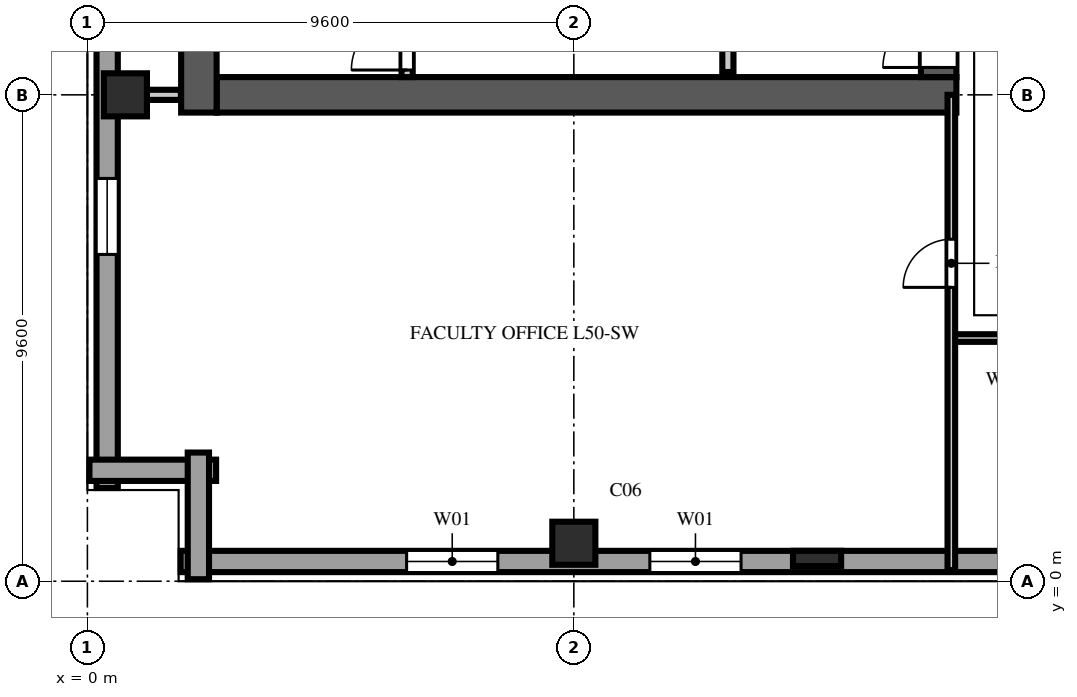
"""IFC4 building model, lengths in metres.
Left out: names, types, materials, properties, quantities, classifications, styles, units other than length and angle.
Written with IfcOpenShell. Run it as: python <this file> out.ifc"""

import sys

from ifc_helpers import new_model, si_unit, direction, frame, frame_2d, origin, origin_2d, place, context, subcontext, project, spatial, rectangle, extrude, element, fill, save


model = new_model("IFC4")
c1 = context("Model", 3, precision=1e-05, world=origin(), true_north=direction((0.0, 1.0)))
c2 = subcontext(c1, "Body", "Model", "MODEL_VIEW")
j1 = project(units=[si_unit("LENGTHUNIT", "METRE"), si_unit("PLANEANGLEUNIT", "RADIAN")], contexts=[c1])
p1 = place(None, origin())
s1 = spatial("IfcSite", under=j1, at=p1, CompositionType="ELEMENT")
p2 = place(p1, origin())
s2 = spatial("IfcBuilding", under=s1, at=p2, CompositionType="ELEMENT")
p3 = place(p2, frame((0.0, 0.0, 199.0)))
s3 = spatial("IfcBuildingStorey", under=s2, at=p3, CompositionType="ELEMENT", Elevation=199.0)
p4 = place(p3, frame((2.55, 9.6, 0.0), z_axis=(0.0, 0.0, 1.0), x_axis=(1.0, 0.0, 0.0)))
e1 = element("IfcWall", 1, at=p4, inside=s3, PredefinedType="SHEAR", context=c2, shape_type="SweptSolid", body=[
    extrude(rectangle(XDim=14.6, YDim=0.7, at=frame_2d((7.3, 0.0))), origin(), (0.0, 0.0, 1.0), 3.54),
])
p5 = place(p3, frame((2.2, 9.25, 0.0), z_axis=(0.0, 0.0, 1.0), x_axis=(0.0, 1.0, 0.0)))
e2 = element("IfcWall", 2, at=p5, inside=s3, PredefinedType="SHEAR", context=c2, shape_type="SweptSolid", body=[
    extrude(rectangle(XDim=39.1, YDim=0.7, at=frame_2d((19.55, 0.0))), origin(), (0.0, 0.0, 1.0), 3.54),
])
p6 = place(p3, frame((16.8, 9.95, 0.0), z_axis=(0.0, 0.0, 1.0), x_axis=(0.0, 1.0, 0.0)))
e3 = element("IfcWall", 3, at=p6, inside=s3, PredefinedType="SHEAR", context=c2, shape_type="SweptSolid", body=[
    extrude(rectangle(XDim=12.45, YDim=0.7, at=frame_2d((6.225, 0.0))), origin(), (0.0, 0.0, 1.0), 3.54),
])
p7 = place(p6, frame((0.19, 0.0, 0.0)))
e4 = element("IfcOpeningElement", 4, at=p7, cuts=e3, PredefinedType="OPENING", context=c2, shape_type="SweptSolid", body=[
    extrude(rectangle(XDim=1.1, YDim=2.2, at=frame_2d((0.55, 1.1))), frame((0.0, 0.362, 0.0), z_axis=(0.0, -1.0, 0.0), x_axis=(1.0, 0.0, 0.0)), (0.0, 0.0, 1.0), 0.724),
])
for number, where, z_axis, x_axis in (
    (5, (0.75, 9.6, 0.0), (0.0, 0.0, 1.0), (1.0, 0.0, 0.0)),
    (6, (9.6, 0.75, 0.0), (0.0, 0.0, 1.0), (1.0, 0.0, 0.0)),
):
    element("IfcColumn", number, at=place(p3, frame(where, z_axis=z_axis, x_axis=x_axis)), inside=s3, PredefinedType="COLUMN", context=c2, shape_type="SweptSolid", body=[
        extrude(rectangle(XDim=0.85, YDim=0.85, at=origin_2d()), origin(), (0.0, 0.0, 1.0), 3.8),
    ])
p8 = place(p3, frame((14.4, 0.45, 0.0), z_axis=(0.0, 0.0, 1.0), x_axis=(1.0, 0.0, 0.0)))
e7 = element("IfcColumn", 7, at=p8, inside=s3, PredefinedType="PILASTER", context=c2, shape_type="SweptSolid", body=[
    extrude(rectangle(XDim=0.95, YDim=0.3, at=origin_2d()), origin(), (0.0, 0.0, 1.0), 3.8),
])
p9 = place(p3, frame((1.84, 0.39, 0.0), z_axis=(0.0, 0.0, 1.0), x_axis=(1.0, 0.0, 0.0)))
e8 = element("IfcWall", 8, at=p9, inside=s3, PredefinedType="SOLIDWALL", context=c2, shape_type="SweptSolid", body=[
    extrude(rectangle(XDim=53.92, YDim=0.42, at=frame_2d((26.96, 0.0))), origin(), (0.0, 0.0, 1.0), 3.54),
])
p10 = place(p9, frame((4.46, 0.0, 0.85)))
e9 = element("IfcOpeningElement", 9, at=p10, cuts=e8, PredefinedType="OPENING", context=c2, shape_type="SweptSolid", body=[
    extrude(rectangle(XDim=1.8, YDim=1.85, at=frame_2d((0.9, 0.925))), frame((0.0, 0.222, 0.0), z_axis=(0.0, -1.0, 0.0), x_axis=(1.0, 0.0, 0.0)), (0.0, 0.0, 1.0), 0.444),
])
p11 = place(p9, frame((9.26, 0.0, 0.85)))
e10 = element("IfcOpeningElement", 10, at=p11, cuts=e8, PredefinedType="OPENING", context=c2, shape_type="SweptSolid", body=[
    extrude(rectangle(XDim=1.8, YDim=1.85, at=frame_2d((0.9, 0.925))), frame((0.0, 0.222, 0.0), z_axis=(0.0, -1.0, 0.0), x_axis=(1.0, 0.0, 0.0)), (0.0, 0.0, 1.0), 0.444),
])
p12 = place(p9, frame((18.86, 0.0, 0.85)))
e11 = element("IfcOpeningElement", 11, at=p12, cuts=e8, PredefinedType="OPENING", context=c2, shape_type="SweptSolid", body=[
    extrude(rectangle(XDim=1.8, YDim=1.85, at=frame_2d((0.9, 0.925))), frame((0.0, 0.222, 0.0), z_axis=(0.0, -1.0, 0.0), x_axis=(1.0, 0.0, 0.0)), (0.0, 0.0, 1.0), 0.444),
])
p13 = place(p9, frame((28.46, 0.0, 0.85)))
e12 = element("IfcOpeningElement", 12, at=p13, cuts=e8, PredefinedType="OPENING", context=c2, shape_type="SweptSolid", body=[
    extrude(rectangle(XDim=1.8, YDim=1.85, at=frame_2d((0.9, 0.925))), frame((0.0, 0.222, 0.0), z_axis=(0.0, -1.0, 0.0), x_axis=(1.0, 0.0, 0.0)), (0.0, 0.0, 1.0), 0.444),
])
p14 = place(p9, frame((33.26, 0.0, 0.85)))
e13 = element("IfcOpeningElement", 13, at=p14, cuts=e8, PredefinedType="OPENING", context=c2, shape_type="SweptSolid", body=[
    extrude(rectangle(XDim=1.8, YDim=1.85, at=frame_2d((0.9, 0.925))), frame((0.0, 0.222, 0.0), z_axis=(0.0, -1.0, 0.0), x_axis=(1.0, 0.0, 0.0)), (0.0, 0.0, 1.0), 0.444),
])
p15 = place(p9, frame((38.06, 0.0, 0.85)))
e14 = element("IfcOpeningElement", 14, at=p15, cuts=e8, PredefinedType="OPENING", context=c2, shape_type="SweptSolid", body=[
    extrude(rectangle(XDim=1.8, YDim=1.85, at=frame_2d((0.9, 0.925))), frame((0.0, 0.222, 0.0), z_axis=(0.0, -1.0, 0.0), x_axis=(1.0, 0.0, 0.0)), (0.0, 0.0, 1.0), 0.444),
])
p16 = place(p9, frame((42.86, 0.0, 0.85)))
e15 = element("IfcOpeningElement", 15, at=p16, cuts=e8, PredefinedType="OPENING", context=c2, shape_type="SweptSolid", body=[
    extrude(rectangle(XDim=1.8, YDim=1.85, at=frame_2d((0.9, 0.925))), frame((0.0, 0.222, 0.0), z_axis=(0.0, -1.0, 0.0), x_axis=(1.0, 0.0, 0.0)), (0.0, 0.0, 1.0), 0.444),
])
p17 = place(p9, frame((47.66, 0.0, 0.85)))
e16 = element("IfcOpeningElement", 16, at=p17, cuts=e8, PredefinedType="OPENING", context=c2, shape_type="SweptSolid", body=[
    extrude(rectangle(XDim=1.8, YDim=1.85, at=frame_2d((0.9, 0.925))), frame((0.0, 0.222, 0.0), z_axis=(0.0, -1.0, 0.0), x_axis=(1.0, 0.0, 0.0)), (0.0, 0.0, 1.0), 0.444),
])
p18 = place(p3, frame((0.39, 55.76, 0.0), z_axis=(0.0, 0.0, 1.0), x_axis=(0.0, -1.0, 0.0)))
e17 = element("IfcWall", 17, at=p18, inside=s3, PredefinedType="SOLIDWALL", context=c2, shape_type="SweptSolid", body=[
    extrude(rectangle(XDim=53.92, YDim=0.42, at=frame_2d((26.96, 0.0))), origin(), (0.0, 0.0, 1.0), 3.54),
])
p19 = place(p18, frame((4.885, 0.0, 0.9)))
e18 = element("IfcOpeningElement", 18, at=p19, cuts=e17, PredefinedType="OPENING", context=c2, shape_type="SweptSolid", body=[
    extrude(rectangle(XDim=0.95, YDim=1.85, at=frame_2d((0.475, 0.925))), frame((0.0, 0.222, 0.0), z_axis=(0.0, -1.0, 0.0), x_axis=(1.0, 0.0, 0.0)), (0.0, 0.0, 1.0), 0.444),
])
p20 = place(p18, frame((9.41, 0.0, 0.9)))
e19 = element("IfcOpeningElement", 19, at=p20, cuts=e17, PredefinedType="OPENING", context=c2, shape_type="SweptSolid", body=[
    extrude(rectangle(XDim=1.5, YDim=1.85, at=frame_2d((0.75, 0.925))), frame((0.0, 0.222, 0.0), z_axis=(0.0, -1.0, 0.0), x_axis=(1.0, 0.0, 0.0)), (0.0, 0.0, 1.0), 0.444),
])
p21 = place(p18, frame((14.485, 0.0, 0.9)))
e20 = element("IfcOpeningElement", 20, at=p21, cuts=e17, PredefinedType="OPENING", context=c2, shape_type="SweptSolid", body=[
    extrude(rectangle(XDim=0.95, YDim=1.85, at=frame_2d((0.475, 0.925))), frame((0.0, 0.222, 0.0), z_axis=(0.0, -1.0, 0.0), x_axis=(1.0, 0.0, 0.0)), (0.0, 0.0, 1.0), 0.444),
])
p22 = place(p18, frame((19.01, 0.0, 0.9)))
e21 = element("IfcOpeningElement", 21, at=p22, cuts=e17, PredefinedType="OPENING", context=c2, shape_type="SweptSolid", body=[
    extrude(rectangle(XDim=1.5, YDim=1.85, at=frame_2d((0.75, 0.925))), frame((0.0, 0.222, 0.0), z_axis=(0.0, -1.0, 0.0), x_axis=(1.0, 0.0, 0.0)), (0.0, 0.0, 1.0), 0.444),
])
p23 = place(p18, frame((24.085, 0.0, 0.9)))
e22 = element("IfcOpeningElement", 22, at=p23, cuts=e17, PredefinedType="OPENING", context=c2, shape_type="SweptSolid", body=[
    extrude(rectangle(XDim=0.95, YDim=1.85, at=frame_2d((0.475, 0.925))), frame((0.0, 0.222, 0.0), z_axis=(0.0, -1.0, 0.0), x_axis=(1.0, 0.0, 0.0)), (0.0, 0.0, 1.0), 0.444),
])
p24 = place(p18, frame((28.61, 0.0, 0.9)))
e23 = element("IfcOpeningElement", 23, at=p24, cuts=e17, PredefinedType="OPENING", context=c2, shape_type="SweptSolid", body=[
    extrude(rectangle(XDim=1.5, YDim=1.85, at=frame_2d((0.75, 0.925))), frame((0.0, 0.222, 0.0), z_axis=(0.0, -1.0, 0.0), x_axis=(1.0, 0.0, 0.0)), (0.0, 0.0, 1.0), 0.444),
])
p25 = place(p18, frame((33.685, 0.0, 0.9)))
e24 = element("IfcOpeningElement", 24, at=p25, cuts=e17, PredefinedType="OPENING", context=c2, shape_type="SweptSolid", body=[
    extrude(rectangle(XDim=0.95, YDim=1.85, at=frame_2d((0.475, 0.925))), frame((0.0, 0.222, 0.0), z_axis=(0.0, -1.0, 0.0), x_axis=(1.0, 0.0, 0.0)), (0.0, 0.0, 1.0), 0.444),
])
p26 = place(p18, frame((38.21, 0.0, 0.9)))
e25 = element("IfcOpeningElement", 25, at=p26, cuts=e17, PredefinedType="OPENING", context=c2, shape_type="SweptSolid", body=[
    extrude(rectangle(XDim=1.5, YDim=1.85, at=frame_2d((0.75, 0.925))), frame((0.0, 0.222, 0.0), z_axis=(0.0, -1.0, 0.0), x_axis=(1.0, 0.0, 0.0)), (0.0, 0.0, 1.0), 0.444),
])
p27 = place(p18, frame((43.285, 0.0, 0.9)))
e26 = element("IfcOpeningElement", 26, at=p27, cuts=e17, PredefinedType="OPENING", context=c2, shape_type="SweptSolid", body=[
    extrude(rectangle(XDim=0.95, YDim=1.85, at=frame_2d((0.475, 0.925))), frame((0.0, 0.222, 0.0), z_axis=(0.0, -1.0, 0.0), x_axis=(1.0, 0.0, 0.0)), (0.0, 0.0, 1.0), 0.444),
])
p28 = place(p18, frame((47.81, 0.0, 0.9)))
e27 = element("IfcOpeningElement", 27, at=p28, cuts=e17, PredefinedType="OPENING", context=c2, shape_type="SweptSolid", body=[
    extrude(rectangle(XDim=1.5, YDim=1.85, at=frame_2d((0.75, 0.925))), frame((0.0, 0.222, 0.0), z_axis=(0.0, -1.0, 0.0), x_axis=(1.0, 0.0, 0.0)), (0.0, 0.0, 1.0), 0.444),
])
for number, where, z_axis, x_axis in (
    (28, (0.04, 2.19, 0.0), (0.0, 0.0, 1.0), (1.0, 0.0, 0.0)),
    (29, (2.19, 2.54, 0.0), (0.0, 0.0, 1.0), (0.0, -1.0, 0.0)),
):
    element("IfcWall", number, at=place(p3, frame(where, z_axis=z_axis, x_axis=x_axis)), inside=s3, PredefinedType="SOLIDWALL", context=c2, shape_type="SweptSolid", body=[
        extrude(rectangle(XDim=2.5, YDim=0.42, at=frame_2d((1.25, 0.0))), origin(), (0.0, 0.0, 1.0), 3.54),
    ])
p29 = place(p3, frame((6.31, 9.95, 0.0), z_axis=(0.0, 0.0, 1.0), x_axis=(0.0, 1.0, 0.0)))
e30 = element("IfcWall", 30, at=p29, inside=s3, PredefinedType="SOLIDWALL", context=c2, shape_type="SweptSolid", body=[
    extrude(rectangle(XDim=7.81, YDim=0.22, at=frame_2d((3.905, 0.0))), origin(), (0.0, 0.0, 1.0), 3.54),
])
p30 = place(p29, frame((0.14, 0.0, 0.0)))
e31 = element("IfcOpeningElement", 31, at=p30, cuts=e30, PredefinedType="OPENING", context=c2, shape_type="SweptSolid", body=[
    extrude(rectangle(XDim=1.1, YDim=2.2, at=frame_2d((0.55, 1.1))), frame((0.0, 0.122, 0.0), z_axis=(0.0, -1.0, 0.0), x_axis=(1.0, 0.0, 0.0)), (0.0, 0.0, 1.0), 0.244),
])
p31 = place(p3, frame((12.64, 10.05, 0.0), z_axis=(0.0, 0.0, 1.0), x_axis=(0.0, 1.0, 0.0)))
e32 = element("IfcWall", 32, at=p31, inside=s3, PredefinedType="SOLIDWALL", context=c2, shape_type="SweptSolid", body=[
    extrude(rectangle(XDim=7.71, YDim=0.22, at=frame_2d((3.855, 0.0))), origin(), (0.0, 0.0, 1.0), 3.54),
])
p32 = place(p3, frame((0.85, 9.6, 0.0), z_axis=(0.0, 0.0, 1.0), x_axis=(1.0, 0.0, 0.0)))
e33 = element("IfcWall", 33, at=p32, inside=s3, PredefinedType="SOLIDWALL", context=c2, shape_type="SweptSolid", body=[
    extrude(rectangle(XDim=0.995, YDim=0.2, at=frame_2d((0.498, 0.0))), origin(), (0.0, 0.0, 1.0), 2.996),
])
p33 = place(p3, frame((17.05, 4.8, 0.0), z_axis=(0.0, 0.0, 1.0), x_axis=(1.0, 0.0, 0.0)))
e34 = element("IfcWall", 34, at=p33, inside=s3, PredefinedType="PARTITIONING", context=c2, shape_type="SweptSolid", body=[
    extrude(rectangle(XDim=2.15, YDim=0.15, at=frame_2d((1.075, 0.0))), origin(), (0.0, 0.0, 1.0), 3.54),
])
p34 = place(p3, frame((17.05, 0.22, 0.0), z_axis=(0.0, 0.0, 1.0), x_axis=(0.0, 1.0, 0.0)))
e35 = element("IfcWall", 35, at=p34, inside=s3, PredefinedType="PARTITIONING", context=c2, shape_type="SweptSolid", body=[
    extrude(rectangle(XDim=9.38, YDim=0.15, at=frame_2d((4.69, 0.0))), origin(), (0.0, 0.0, 1.0), 3.54),
])
p35 = place(p34, frame((5.58, 0.0, 0.0)))
e36 = element("IfcOpeningElement", 36, at=p35, cuts=e35, PredefinedType="OPENING", context=c2, shape_type="SweptSolid", body=[
    extrude(rectangle(XDim=0.95, YDim=2.15, at=frame_2d((0.475, 1.075))), frame((0.0, 0.087, 0.0), z_axis=(0.0, -1.0, 0.0), x_axis=(1.0, 0.0, 0.0)), (0.0, 0.0, 1.0), 0.174),
])
p36 = place(p10, origin())
e37 = element("IfcWindow", 37, at=p36, inside=s3, PartitioningType="DOUBLE_PANEL_VERTICAL", PredefinedType="WINDOW", context=c2, shape_type="SweptSolid", body=[
    extrude(rectangle(XDim=1.8, YDim=1.85, at=frame_2d((0.9, 0.925))), frame((0.0, 0.11, 0.0), z_axis=(0.0, -1.0, 0.0), x_axis=(1.0, 0.0, 0.0)), (0.0, 0.0, 1.0), 0.06),
])
fill(e9, e37)
p37 = place(p11, origin())
e38 = element("IfcWindow", 38, at=p37, inside=s3, PartitioningType="DOUBLE_PANEL_VERTICAL", PredefinedType="WINDOW", context=c2, shape_type="SweptSolid", body=[
    extrude(rectangle(XDim=1.8, YDim=1.85, at=frame_2d((0.9, 0.925))), frame((0.0, 0.11, 0.0), z_axis=(0.0, -1.0, 0.0), x_axis=(1.0, 0.0, 0.0)), (0.0, 0.0, 1.0), 0.06),
])
fill(e10, e38)
p38 = place(p28, origin())
e39 = element("IfcWindow", 39, at=p38, inside=s3, PartitioningType="DOUBLE_PANEL_VERTICAL", PredefinedType="WINDOW", context=c2, shape_type="SweptSolid", body=[
    extrude(rectangle(XDim=1.5, YDim=1.85, at=frame_2d((0.75, 0.925))), frame((0.0, 0.11, 0.0), z_axis=(0.0, -1.0, 0.0), x_axis=(1.0, 0.0, 0.0)), (0.0, 0.0, 1.0), 0.06),
])
fill(e27, e39)
p39 = place(p30, origin())
e40 = element("IfcDoor", 40, at=p39, inside=s3, OperationType="SINGLE_SWING_LEFT", PredefinedType="DOOR", context=c2, shape_type="SweptSolid", body=[
    extrude(rectangle(XDim=1.1, YDim=2.2, at=frame_2d((0.55, 1.1))), frame((0.0, 0.025, 0.0), z_axis=(0.0, -1.0, 0.0), x_axis=(1.0, 0.0, 0.0)), (0.0, 0.0, 1.0), 0.05),
])
fill(e31, e40)
p40 = place(p7, origin())
e41 = element("IfcDoor", 41, at=p40, inside=s3, OperationType="SINGLE_SWING_LEFT", PredefinedType="DOOR", context=c2, shape_type="SweptSolid", body=[
    extrude(rectangle(XDim=1.1, YDim=2.2, at=frame_2d((0.55, 1.1))), frame((0.0, 0.025, 0.0), z_axis=(0.0, -1.0, 0.0), x_axis=(1.0, 0.0, 0.0)), (0.0, 0.0, 1.0), 0.05),
])
fill(e4, e41)
p41 = place(p35, origin())
e42 = element("IfcDoor", 42, at=p41, inside=s3, OperationType="SINGLE_SWING_LEFT", PredefinedType="DOOR", context=c2, shape_type="SweptSolid", body=[
    extrude(rectangle(XDim=0.95, YDim=2.15, at=frame_2d((0.475, 1.075))), frame((0.0, 0.025, 0.0), z_axis=(0.0, -1.0, 0.0), x_axis=(1.0, 0.0, 0.0)), (0.0, 0.0, 1.0), 0.05),
])
fill(e36, e42)
save(model, sys.argv[1])
